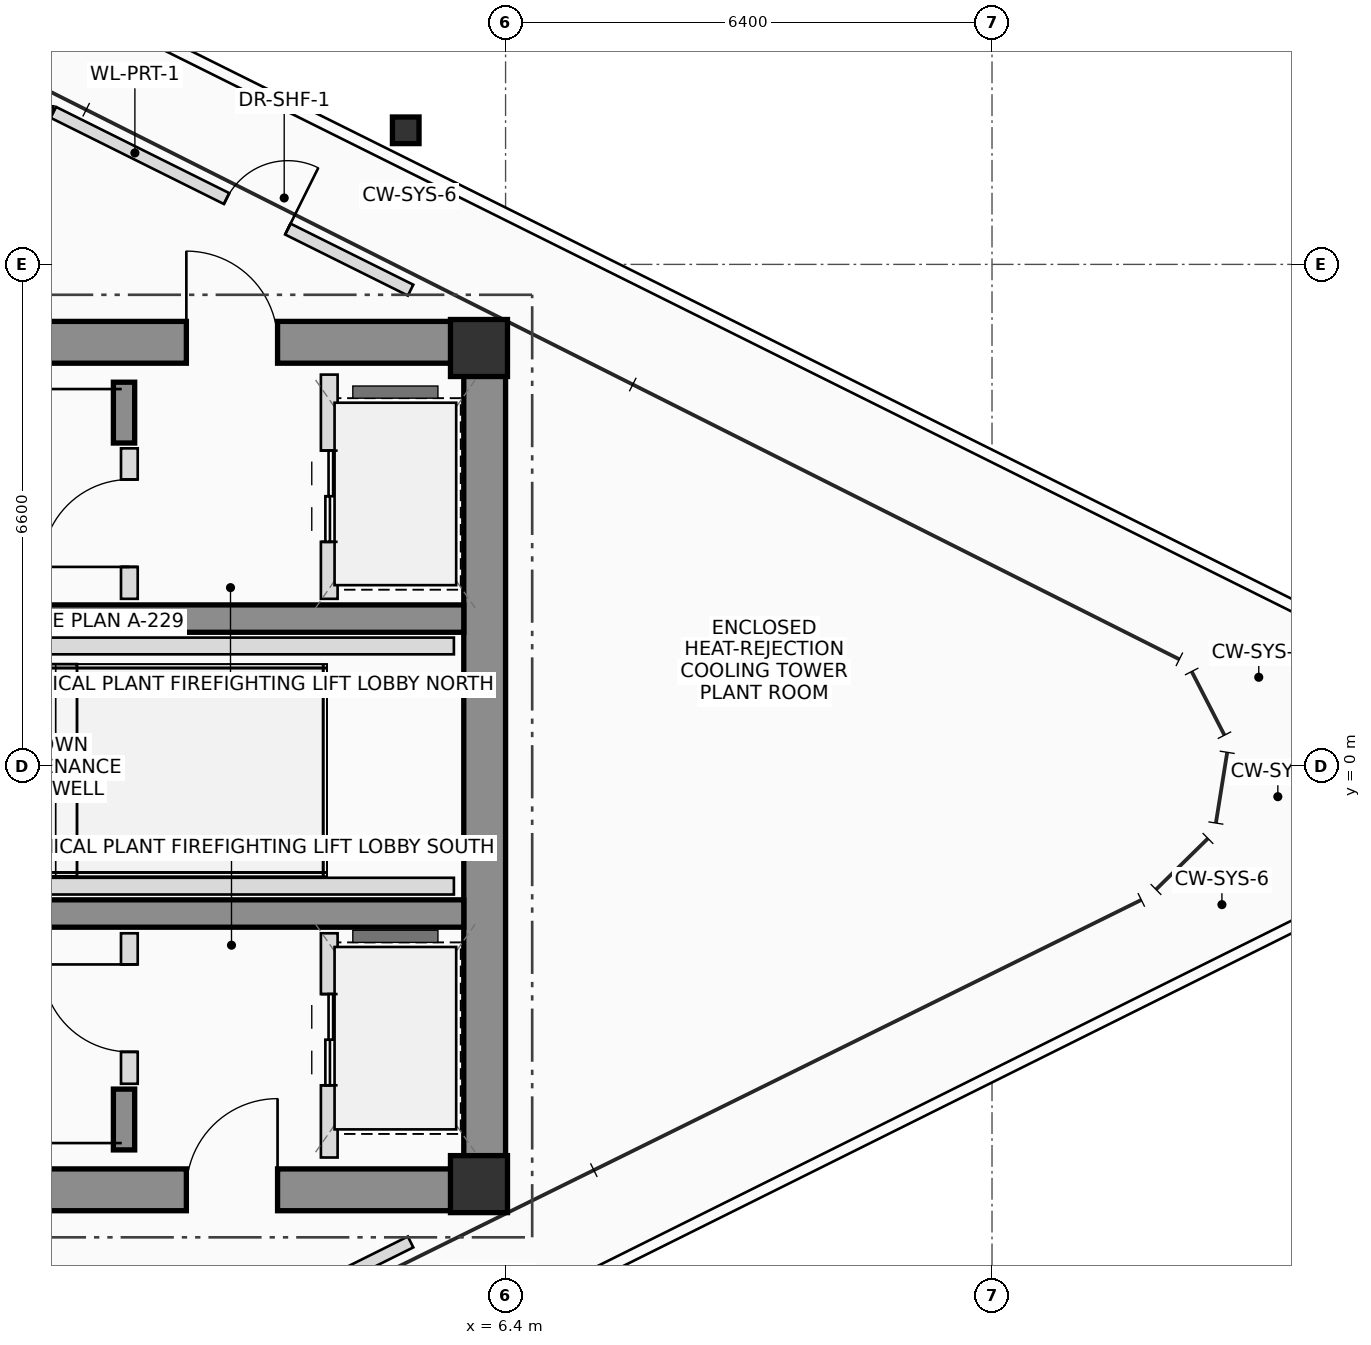
"""IFC4 building model, lengths in metres.
Left out: names, types, materials, properties, quantities, classifications, styles, units other than length and angle.
Written with IfcOpenShell. Run it as: python <this file> out.ifc"""

import sys

from ifc_helpers import new_model, si_unit, direction, frame, frame_2d, origin, origin_2d, place, context, subcontext, project, spatial, rectangle, i_section, extrude, source, transform, mapped, element, fill, save


model = new_model("IFC4")
c1 = context("Model", 3, precision=1e-05, world=origin(), true_north=direction((0.0, 1.0)))
c2 = subcontext(c1, "Body", "Model", "MODEL_VIEW")
j1 = project(units=[si_unit("LENGTHUNIT", "METRE"), si_unit("PLANEANGLEUNIT", "RADIAN")], contexts=[c1])
p1 = place(None, origin())
s1 = spatial("IfcSite", under=j1, at=p1, CompositionType="ELEMENT")
p2 = place(p1, origin())
s2 = spatial("IfcBuilding", under=s1, at=p2, CompositionType="ELEMENT")
p3 = place(p2, frame((0.0, 0.0, 322.85)))
s3 = spatial("IfcBuildingStorey", under=s2, at=p3, CompositionType="ELEMENT", Elevation=322.85)
m1 = source(origin(), c2, "Body", "SweptSolid", [
    extrude(rectangle(XDim=0.75, YDim=0.75, at=origin_2d()), origin(), (0.0, 0.0, 1.0), 5.4),
])
for number, where, z_axis, x_axis in (
    (1, (6.05, -5.5, 0.0), (0.0, 0.0, 1.0), (1.0, 0.0, 0.0)),
    (2, (6.05, 5.5, 0.0), (0.0, 0.0, 1.0), (1.0, 0.0, 0.0)),
):
    element("IfcColumn", number, at=place(p3, frame(where, z_axis=z_axis, x_axis=x_axis)), inside=s3, PredefinedType="COLUMN", context=c2, shape_type="MappedRepresentation", body=[
        mapped(m1, transform((0.0, 0.0, 0.0), scale=1.0)),
    ])
p4 = place(p3, frame((-6.4, 5.575, 0.0), z_axis=(0.0, 0.0, 1.0), x_axis=(1.0, 0.0, 0.0)))
e3 = element("IfcWall", 3, at=p4, inside=s3, PredefinedType="SHEAR", context=c2, shape_type="SweptSolid", body=[
    extrude(rectangle(XDim=12.8, YDim=0.55, at=frame_2d((6.4, 0.0))), origin(), (0.0, 0.0, 1.0), 5.4),
])
p5 = place(p4, frame((8.6, 0.0, 0.0)))
e4 = element("IfcOpeningElement", 4, at=p5, cuts=e3, PredefinedType="OPENING", context=c2, shape_type="SweptSolid", body=[
    extrude(rectangle(XDim=1.2, YDim=2.2, at=frame_2d((0.6, 1.1))), frame((0.0, 0.285, 0.0), z_axis=(0.0, -1.0, 0.0), x_axis=(1.0, 0.0, 0.0)), (0.0, 0.0, 1.0), 0.57),
])
p6 = place(p3, frame((-6.4, -5.575, 0.0), z_axis=(0.0, 0.0, 1.0), x_axis=(1.0, 0.0, 0.0)))
e5 = element("IfcWall", 5, at=p6, inside=s3, PredefinedType="SHEAR", context=c2, shape_type="SweptSolid", body=[
    extrude(rectangle(XDim=12.8, YDim=0.55, at=frame_2d((6.4, 0.0))), origin(), (0.0, 0.0, 1.0), 5.4),
])
p7 = place(p6, frame((8.6, 0.0, 0.0)))
e6 = element("IfcOpeningElement", 6, at=p7, cuts=e5, PredefinedType="OPENING", context=c2, shape_type="SweptSolid", body=[
    extrude(rectangle(XDim=1.2, YDim=2.2, at=frame_2d((0.6, 1.1))), frame((0.0, 0.285, 0.0), z_axis=(0.0, -1.0, 0.0), x_axis=(1.0, 0.0, 0.0)), (0.0, 0.0, 1.0), 0.57),
])
p8 = place(p3, frame((6.125, -5.3, 0.0), z_axis=(0.0, 0.0, 1.0), x_axis=(0.0, 1.0, 0.0)))
e7 = element("IfcWall", 7, at=p8, inside=s3, PredefinedType="SHEAR", context=c2, shape_type="SweptSolid", body=[
    extrude(rectangle(XDim=10.6, YDim=0.55, at=frame_2d((5.3, 0.0))), origin(), (0.0, 0.0, 1.0), 5.4),
])
for number, where, z_axis, x_axis in (
    (8, (-5.85, 1.94, 0.0), (0.0, 0.0, 1.0), (1.0, 0.0, 0.0)),
    (9, (-5.85, -1.94, 0.0), (0.0, 0.0, 1.0), (1.0, 0.0, 0.0)),
):
    element("IfcWall", number, at=place(p3, frame(where, z_axis=z_axis, x_axis=x_axis)), inside=s3, PredefinedType="SHEAR", context=c2, shape_type="SweptSolid", body=[
        extrude(rectangle(XDim=11.7, YDim=0.36, at=frame_2d((5.85, 0.0))), origin(), (0.0, 0.0, 1.0), 5.4),
    ])
for number, where, z_axis, x_axis in (
    (10, (1.38, 4.25, 0.0), (0.0, 0.0, 1.0), (0.0, 1.0, 0.0)),
    (11, (1.38, -5.05, 0.0), (0.0, 0.0, 1.0), (0.0, 1.0, 0.0)),
):
    element("IfcWall", number, at=place(p3, frame(where, z_axis=z_axis, x_axis=x_axis)), inside=s3, PredefinedType="SHEAR", context=c2, shape_type="SweptSolid", body=[
        extrude(rectangle(XDim=0.8, YDim=0.28, at=frame_2d((0.4, 0.0))), origin(), (0.0, 0.0, 1.0), 5.4),
    ])
m2 = source(origin(), c2, "Body", "SweptSolid", [
    extrude(i_section(OverallWidth=0.35, OverallDepth=0.35, WebThickness=0.012, FlangeThickness=0.019, FilletRadius=0.016, at=origin_2d()), origin(), (0.0, 0.0, 1.0), 5.4),
])
p9 = place(p3, frame((5.086, 8.364, 0.0), z_axis=(0.0, 0.0, 1.0), x_axis=(1.0, 0.0, 0.0)))
e12 = element("IfcColumn", 12, at=p9, inside=s3, PredefinedType="COLUMN", context=c2, shape_type="MappedRepresentation", body=[
    mapped(m2, transform((0.0, 0.0, 0.0), scale=1.0)),
])
p10 = place(p3, frame((1.45, 2.2, 0.0), z_axis=(0.0, 0.0, 1.0), x_axis=(0.0, 1.0, 0.0)))
e13 = element("IfcWall", 13, at=p10, inside=s3, PredefinedType="PLUMBINGWALL", context=c2, shape_type="SweptSolid", body=[
    extrude(rectangle(XDim=1.98, YDim=0.22, at=frame_2d((0.99, 0.0))), origin(), (0.0, 0.0, 1.0), 5.12),
])
p11 = place(p10, frame((0.42, 0.0, 0.0)))
e14 = element("IfcOpeningElement", 14, at=p11, cuts=e13, PredefinedType="OPENING", context=c2, shape_type="SweptSolid", body=[
    extrude(rectangle(XDim=1.15, YDim=2.15, at=frame_2d((0.575, 1.075))), frame((0.0, 0.12, 0.0), z_axis=(0.0, -1.0, 0.0), x_axis=(1.0, 0.0, 0.0)), (0.0, 0.0, 1.0), 0.24),
])
p12 = place(p3, frame((4.08, 2.2, 0.0), z_axis=(0.0, 0.0, 1.0), x_axis=(0.0, 1.0, 0.0)))
e15 = element("IfcWall", 15, at=p12, inside=s3, PredefinedType="PLUMBINGWALL", context=c2, shape_type="SweptSolid", body=[
    extrude(rectangle(XDim=2.95, YDim=0.22, at=frame_2d((1.475, 0.0))), origin(), (0.0, 0.0, 1.0), 5.12),
])
p13 = place(p12, frame((0.75, 0.0, 0.0)))
e16 = element("IfcOpeningElement", 16, at=p13, cuts=e15, PredefinedType="OPENING", context=c2, shape_type="SweptSolid", body=[
    extrude(rectangle(XDim=1.2, YDim=2.25, at=frame_2d((0.6, 1.125))), frame((0.0, 0.12, 0.0), z_axis=(0.0, -1.0, 0.0), x_axis=(1.0, 0.0, 0.0)), (0.0, 0.0, 1.0), 0.24),
])
p14 = place(p3, frame((1.45, -4.18, 0.0), z_axis=(0.0, 0.0, 1.0), x_axis=(0.0, 1.0, 0.0)))
e17 = element("IfcWall", 17, at=p14, inside=s3, PredefinedType="PLUMBINGWALL", context=c2, shape_type="SweptSolid", body=[
    extrude(rectangle(XDim=1.98, YDim=0.22, at=frame_2d((0.99, 0.0))), origin(), (0.0, 0.0, 1.0), 5.12),
])
p15 = place(p14, frame((0.42, 0.0, 0.0)))
e18 = element("IfcOpeningElement", 18, at=p15, cuts=e17, PredefinedType="OPENING", context=c2, shape_type="SweptSolid", body=[
    extrude(rectangle(XDim=1.15, YDim=2.15, at=frame_2d((0.575, 1.075))), frame((0.0, 0.12, 0.0), z_axis=(0.0, -1.0, 0.0), x_axis=(1.0, 0.0, 0.0)), (0.0, 0.0, 1.0), 0.24),
])
p16 = place(p3, frame((4.08, -5.15, 0.0), z_axis=(0.0, 0.0, 1.0), x_axis=(0.0, 1.0, 0.0)))
e19 = element("IfcWall", 19, at=p16, inside=s3, PredefinedType="PLUMBINGWALL", context=c2, shape_type="SweptSolid", body=[
    extrude(rectangle(XDim=2.95, YDim=0.22, at=frame_2d((1.475, 0.0))), origin(), (0.0, 0.0, 1.0), 5.12),
])
p17 = place(p16, frame((0.95, 0.0, 0.0)))
e20 = element("IfcOpeningElement", 20, at=p17, cuts=e19, PredefinedType="OPENING", context=c2, shape_type="SweptSolid", body=[
    extrude(rectangle(XDim=1.2, YDim=2.25, at=frame_2d((0.6, 1.125))), frame((0.0, 0.12, 0.0), z_axis=(0.0, -1.0, 0.0), x_axis=(1.0, 0.0, 0.0)), (0.0, 0.0, 1.0), 0.24),
])
for number, where, z_axis, x_axis in (
    (21, (-2.92, 1.58, 0.0), (0.0, 0.0, 1.0), (1.0, 0.0, 0.0)),
    (22, (-2.92, -1.58, 0.0), (0.0, 0.0, 1.0), (1.0, 0.0, 0.0)),
):
    element("IfcWall", number, at=place(p3, frame(where, z_axis=z_axis, x_axis=x_axis)), inside=s3, PredefinedType="PLUMBINGWALL", context=c2, shape_type="SweptSolid", body=[
        extrude(rectangle(XDim=8.64, YDim=0.22, at=frame_2d((4.32, 0.0))), origin(), (0.0, 0.0, 1.0), 3.59),
    ])
p18 = place(p3, frame((-9.052, 8.6, 0.0), z_axis=(0.0, 0.0, 1.0), x_axis=(1.0, 0.0, 0.0)))
e23 = element("IfcWall", 23, at=p18, inside=s3, PredefinedType="PARTITIONING", context=c2, shape_type="SweptSolid", body=[
    extrude(rectangle(XDim=9.502, YDim=0.16, at=frame_2d((4.751, 0.0))), origin(), (0.0, 0.0, 1.0), 5.12),
])
p19 = place(p3, frame((0.451, 8.6, 0.0), z_axis=(0.0, 0.0, 1.0), x_axis=(0.895225733131, -0.445612933766, 0.0)))
e24 = element("IfcWall", 24, at=p19, inside=s3, PredefinedType="PARTITIONING", context=c2, shape_type="SweptSolid", body=[
    extrude(rectangle(XDim=5.249, YDim=0.16, at=frame_2d((2.625, 0.0))), origin(), (0.0, 0.0, 1.0), 5.12),
])
p20 = place(p19, frame((2.545, 0.0, 0.0)))
e25 = element("IfcOpeningElement", 25, at=p20, cuts=e24, PredefinedType="OPENING", context=c2, shape_type="SweptSolid", body=[
    extrude(rectangle(XDim=0.9, YDim=2.05, at=frame_2d((0.45, 1.025))), frame((0.0, 0.09, 0.0), z_axis=(0.0, -1.0, 0.0), x_axis=(1.0, 0.0, 0.0)), (0.0, 0.0, 1.0), 0.18),
])
p21 = place(p3, frame((5.15, -6.261, 0.0), z_axis=(0.0, 0.0, 1.0), x_axis=(-0.895225733131, -0.445612933766, 0.0)))
e26 = element("IfcWall", 26, at=p21, inside=s3, PredefinedType="PARTITIONING", context=c2, shape_type="SweptSolid", body=[
    extrude(rectangle(XDim=5.249, YDim=0.16, at=frame_2d((2.625, 0.0))), origin(), (0.0, 0.0, 1.0), 5.12),
])
p22 = place(p21, frame((2.175, 0.0, 0.0)))
e27 = element("IfcOpeningElement", 27, at=p22, cuts=e26, PredefinedType="OPENING", context=c2, shape_type="SweptSolid", body=[
    extrude(rectangle(XDim=0.9, YDim=2.05, at=frame_2d((0.45, 1.025))), frame((0.0, 0.09, 0.0), z_axis=(0.0, -1.0, 0.0), x_axis=(1.0, 0.0, 0.0)), (0.0, 0.0, 1.0), 0.18),
])
p23 = place(p5, origin())
e28 = element("IfcDoor", 28, at=p23, inside=s3, OperationType="SINGLE_SWING_LEFT", PredefinedType="DOOR", context=c2, shape_type="SweptSolid", body=[
    extrude(rectangle(XDim=1.2, YDim=2.2, at=frame_2d((0.6, 1.1))), frame((0.0, 0.025, 0.0), z_axis=(0.0, -1.0, 0.0), x_axis=(1.0, 0.0, 0.0)), (0.0, 0.0, 1.0), 0.05),
])
fill(e4, e28)
p24 = place(p7, origin())
e29 = element("IfcDoor", 29, at=p24, inside=s3, OperationType="SINGLE_SWING_RIGHT", PredefinedType="DOOR", context=c2, shape_type="SweptSolid", body=[
    extrude(rectangle(XDim=1.2, YDim=2.2, at=frame_2d((0.6, 1.1))), frame((0.0, 0.025, 0.0), z_axis=(0.0, -1.0, 0.0), x_axis=(1.0, 0.0, 0.0)), (0.0, 0.0, 1.0), 0.05),
])
fill(e6, e29)
p25 = place(p11, origin())
e30 = element("IfcDoor", 30, at=p25, inside=s3, OperationType="SINGLE_SWING_LEFT", PredefinedType="DOOR", context=c2, shape_type="SweptSolid", body=[
    extrude(rectangle(XDim=1.15, YDim=2.15, at=frame_2d((0.575, 1.075))), frame((0.0, 0.025, 0.0), z_axis=(0.0, -1.0, 0.0), x_axis=(1.0, 0.0, 0.0)), (0.0, 0.0, 1.0), 0.05),
])
fill(e14, e30)
p26 = place(p13, origin())
e31 = element("IfcDoor", 31, at=p26, inside=s3, OperationType="DOUBLE_DOOR_SLIDING", PredefinedType="DOOR", context=c2, shape_type="SweptSolid", body=[
    extrude(rectangle(XDim=1.2, YDim=2.25, at=frame_2d((0.6, 1.125))), frame((0.0, 0.025, 0.0), z_axis=(0.0, -1.0, 0.0), x_axis=(1.0, 0.0, 0.0)), (0.0, 0.0, 1.0), 0.05),
])
fill(e16, e31)
p27 = place(p15, origin())
e32 = element("IfcDoor", 32, at=p27, inside=s3, OperationType="SINGLE_SWING_RIGHT", PredefinedType="DOOR", context=c2, shape_type="SweptSolid", body=[
    extrude(rectangle(XDim=1.15, YDim=2.15, at=frame_2d((0.575, 1.075))), frame((0.0, 0.025, 0.0), z_axis=(0.0, -1.0, 0.0), x_axis=(1.0, 0.0, 0.0)), (0.0, 0.0, 1.0), 0.05),
])
fill(e18, e32)
p28 = place(p17, origin())
e33 = element("IfcDoor", 33, at=p28, inside=s3, OperationType="DOUBLE_DOOR_SLIDING", PredefinedType="DOOR", context=c2, shape_type="SweptSolid", body=[
    extrude(rectangle(XDim=1.2, YDim=2.25, at=frame_2d((0.6, 1.125))), frame((0.0, 0.025, 0.0), z_axis=(0.0, -1.0, 0.0), x_axis=(1.0, 0.0, 0.0)), (0.0, 0.0, 1.0), 0.05),
])
fill(e20, e33)
p29 = place(p20, origin())
e34 = element("IfcDoor", 34, at=p29, inside=s3, OperationType="SINGLE_SWING_RIGHT", PredefinedType="DOOR", context=c2, shape_type="SweptSolid", body=[
    extrude(rectangle(XDim=0.9, YDim=2.05, at=frame_2d((0.45, 1.025))), frame((0.0, 0.025, 0.0), z_axis=(0.0, -1.0, 0.0), x_axis=(1.0, 0.0, 0.0)), (0.0, 0.0, 1.0), 0.05),
])
fill(e25, e34)
save(model, sys.argv[1])
